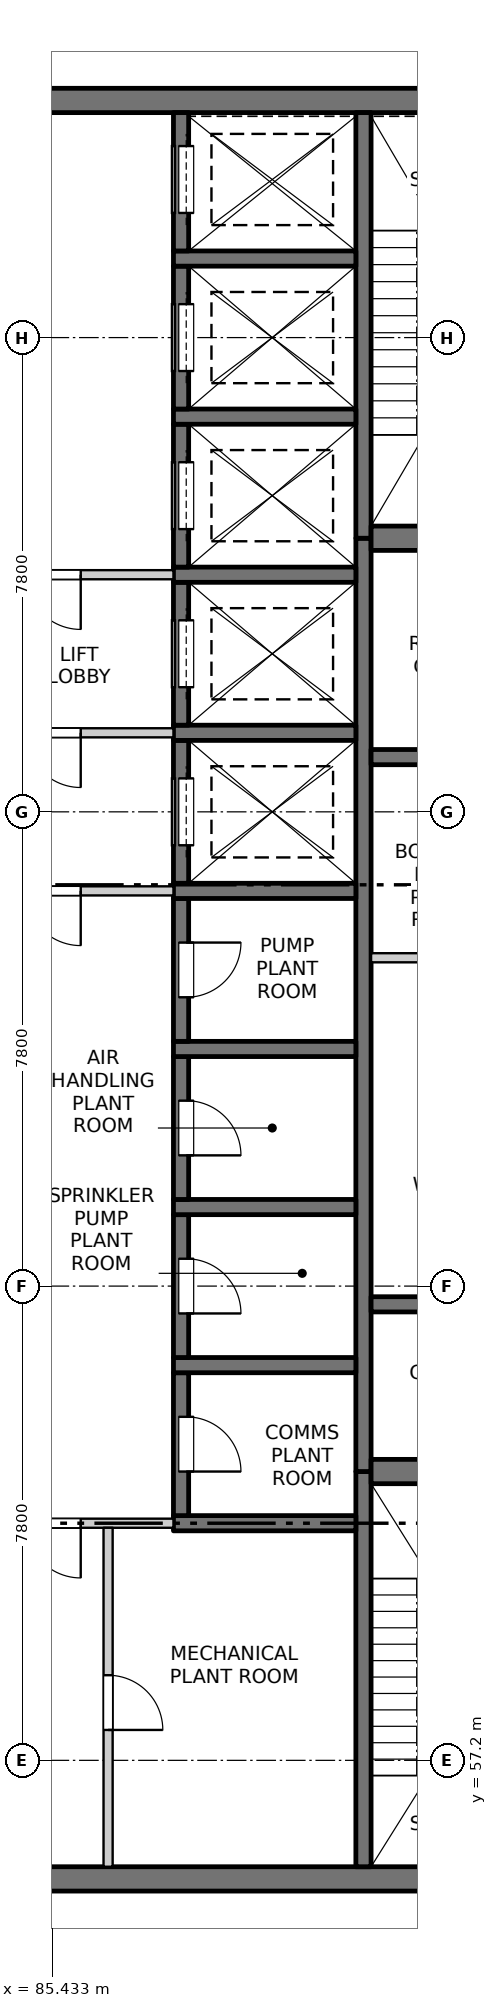
"""IFC4 building model, lengths in metres.
Left out: names, types, materials, properties, quantities, classifications, styles, units other than length and angle.
Written with IfcOpenShell. Run it as: python <this file> out.ifc"""

import sys

from ifc_helpers import new_model, si_unit, direction, frame, frame_2d, origin, place, context, subcontext, project, spatial, rectangle, extrude, element, fill, save


model = new_model("IFC4")
c1 = context("Model", 3, precision=1e-05, world=origin(), true_north=direction((0.0, 1.0)))
c2 = subcontext(c1, "Body", "Model", "MODEL_VIEW")
j1 = project(units=[si_unit("LENGTHUNIT", "METRE"), si_unit("PLANEANGLEUNIT", "RADIAN")], contexts=[c1])
p1 = place(None, origin())
s1 = spatial("IfcSite", under=j1, at=p1, CompositionType="ELEMENT")
p2 = place(p1, origin())
s2 = spatial("IfcBuilding", under=s1, at=p2, CompositionType="ELEMENT")
p3 = place(p2, frame((0.0, 0.0, 241.5)))
s3 = spatial("IfcBuildingStorey", under=s2, at=p3, CompositionType="ELEMENT", Elevation=241.5)
p4 = place(p3, frame((75.45, 55.25, -0.3), z_axis=(0.0, 0.0, 1.0), x_axis=(1.0, 0.0, 0.0)))
e1 = element("IfcWall", 1, at=p4, inside=s3, PredefinedType="SOLIDWALL", context=c2, shape_type="SweptSolid", body=[
    extrude(rectangle(XDim=19.1, YDim=0.4, at=frame_2d((9.55, 0.0))), origin(), (0.0, 0.0, 1.0), 4.5),
])
p5 = place(p4, frame((7.3, 0.0, 0.3)))
e2 = element("IfcOpeningElement", 2, at=p5, cuts=e1, PredefinedType="OPENING", context=c2, shape_type="SweptSolid", body=[
    extrude(rectangle(XDim=1.5, YDim=2.1, at=frame_2d((0.75, 1.05))), frame((0.0, 0.21, 0.0), z_axis=(0.0, -1.0, 0.0), x_axis=(1.0, 0.0, 0.0)), (0.0, 0.0, 1.0), 0.42),
])
p6 = place(p3, frame((75.45, 84.5, -0.3), z_axis=(0.0, 0.0, 1.0), x_axis=(1.0, 0.0, 0.0)))
e3 = element("IfcWall", 3, at=p6, inside=s3, PredefinedType="SOLIDWALL", context=c2, shape_type="SweptSolid", body=[
    extrude(rectangle(XDim=19.1, YDim=0.4, at=frame_2d((9.55, 0.0))), origin(), (0.0, 0.0, 1.0), 4.5),
])
p7 = place(p3, frame((90.55, 55.45, -0.3), z_axis=(0.0, 0.0, 1.0), x_axis=(0.0, 1.0, 0.0)))
e4 = element("IfcWall", 4, at=p7, inside=s3, PredefinedType="SOLIDWALL", context=c2, shape_type="SweptSolid", body=[
    extrude(rectangle(XDim=6.5, YDim=0.25, at=frame_2d((3.25, 0.0))), origin(), (0.0, 0.0, 1.0), 4.5),
])
p8 = place(p3, frame((90.55, 61.95, -0.3), z_axis=(0.0, 0.0, 1.0), x_axis=(0.0, 1.0, 0.0)))
e5 = element("IfcWall", 5, at=p8, inside=s3, PredefinedType="SOLIDWALL", context=c2, shape_type="SweptSolid", body=[
    extrude(rectangle(XDim=15.35, YDim=0.25, at=frame_2d((7.675, 0.0))), origin(), (0.0, 0.0, 1.0), 4.5),
])
p9 = place(p3, frame((90.55, 77.3, -0.3), z_axis=(0.0, 0.0, 1.0), x_axis=(0.0, 1.0, 0.0)))
e6 = element("IfcWall", 6, at=p9, inside=s3, PredefinedType="SOLIDWALL", context=c2, shape_type="SweptSolid", body=[
    extrude(rectangle(XDim=7.0, YDim=0.25, at=frame_2d((3.5, 0.0))), origin(), (0.0, 0.0, 1.0), 4.5),
])
p10 = place(p3, frame((87.425, 61.1, -0.3), z_axis=(0.0, 0.0, 1.0), x_axis=(1.0, 0.0, 0.0)))
e7 = element("IfcWall", 7, at=p10, inside=s3, PredefinedType="SOLIDWALL", context=c2, shape_type="SweptSolid", body=[
    extrude(rectangle(XDim=3.0, YDim=0.25, at=frame_2d((1.5, 0.0))), origin(), (0.0, 0.0, 1.0), 4.5),
])
p11 = place(p3, frame((87.55, 61.225, -0.3), z_axis=(0.0, 0.0, 1.0), x_axis=(0.0, 1.0, 0.0)))
e8 = element("IfcWall", 8, at=p11, inside=s3, PredefinedType="SOLIDWALL", context=c2, shape_type="SweptSolid", body=[
    extrude(rectangle(XDim=2.35, YDim=0.25, at=frame_2d((1.175, 0.0))), origin(), (0.0, 0.0, 1.0), 4.5),
])
p12 = place(p11, frame((0.725, 0.0, 0.3)))
e9 = element("IfcOpeningElement", 9, at=p12, cuts=e8, PredefinedType="OPENING", context=c2, shape_type="SweptSolid", body=[
    extrude(rectangle(XDim=0.9, YDim=2.1, at=frame_2d((0.45, 1.05))), frame((0.0, 0.135, 0.0), z_axis=(0.0, -1.0, 0.0), x_axis=(1.0, 0.0, 0.0)), (0.0, 0.0, 1.0), 0.27),
])
p13 = place(p3, frame((87.425, 63.7, -0.3), z_axis=(0.0, 0.0, 1.0), x_axis=(1.0, 0.0, 0.0)))
e10 = element("IfcWall", 10, at=p13, inside=s3, PredefinedType="SOLIDWALL", context=c2, shape_type="SweptSolid", body=[
    extrude(rectangle(XDim=3.0, YDim=0.25, at=frame_2d((1.5, 0.0))), origin(), (0.0, 0.0, 1.0), 4.5),
])
p14 = place(p3, frame((87.55, 63.825, -0.3), z_axis=(0.0, 0.0, 1.0), x_axis=(0.0, 1.0, 0.0)))
e11 = element("IfcWall", 11, at=p14, inside=s3, PredefinedType="SOLIDWALL", context=c2, shape_type="SweptSolid", body=[
    extrude(rectangle(XDim=2.35, YDim=0.25, at=frame_2d((1.175, 0.0))), origin(), (0.0, 0.0, 1.0), 4.5),
])
p15 = place(p14, frame((0.725, 0.0, 0.3)))
e12 = element("IfcOpeningElement", 12, at=p15, cuts=e11, PredefinedType="OPENING", context=c2, shape_type="SweptSolid", body=[
    extrude(rectangle(XDim=0.9, YDim=2.1, at=frame_2d((0.45, 1.05))), frame((0.0, 0.135, 0.0), z_axis=(0.0, -1.0, 0.0), x_axis=(1.0, 0.0, 0.0)), (0.0, 0.0, 1.0), 0.27),
])
p16 = place(p3, frame((87.425, 66.3, -0.3), z_axis=(0.0, 0.0, 1.0), x_axis=(1.0, 0.0, 0.0)))
e13 = element("IfcWall", 13, at=p16, inside=s3, PredefinedType="SOLIDWALL", context=c2, shape_type="SweptSolid", body=[
    extrude(rectangle(XDim=3.0, YDim=0.25, at=frame_2d((1.5, 0.0))), origin(), (0.0, 0.0, 1.0), 4.5),
])
p17 = place(p3, frame((87.55, 66.425, -0.3), z_axis=(0.0, 0.0, 1.0), x_axis=(0.0, 1.0, 0.0)))
e14 = element("IfcWall", 14, at=p17, inside=s3, PredefinedType="SOLIDWALL", context=c2, shape_type="SweptSolid", body=[
    extrude(rectangle(XDim=2.35, YDim=0.25, at=frame_2d((1.175, 0.0))), origin(), (0.0, 0.0, 1.0), 4.5),
])
p18 = place(p17, frame((0.725, 0.0, 0.3)))
e15 = element("IfcOpeningElement", 15, at=p18, cuts=e14, PredefinedType="OPENING", context=c2, shape_type="SweptSolid", body=[
    extrude(rectangle(XDim=0.9, YDim=2.1, at=frame_2d((0.45, 1.05))), frame((0.0, 0.135, 0.0), z_axis=(0.0, -1.0, 0.0), x_axis=(1.0, 0.0, 0.0)), (0.0, 0.0, 1.0), 0.27),
])
p19 = place(p3, frame((87.425, 68.9, -0.3), z_axis=(0.0, 0.0, 1.0), x_axis=(1.0, 0.0, 0.0)))
e16 = element("IfcWall", 16, at=p19, inside=s3, PredefinedType="SOLIDWALL", context=c2, shape_type="SweptSolid", body=[
    extrude(rectangle(XDim=3.0, YDim=0.25, at=frame_2d((1.5, 0.0))), origin(), (0.0, 0.0, 1.0), 4.5),
])
p20 = place(p3, frame((87.55, 69.025, -0.3), z_axis=(0.0, 0.0, 1.0), x_axis=(0.0, 1.0, 0.0)))
e17 = element("IfcWall", 17, at=p20, inside=s3, PredefinedType="SOLIDWALL", context=c2, shape_type="SweptSolid", body=[
    extrude(rectangle(XDim=2.35, YDim=0.25, at=frame_2d((1.175, 0.0))), origin(), (0.0, 0.0, 1.0), 4.5),
])
p21 = place(p20, frame((0.725, 0.0, 0.3)))
e18 = element("IfcOpeningElement", 18, at=p21, cuts=e17, PredefinedType="OPENING", context=c2, shape_type="SweptSolid", body=[
    extrude(rectangle(XDim=0.9, YDim=2.1, at=frame_2d((0.45, 1.05))), frame((0.0, 0.135, 0.0), z_axis=(0.0, -1.0, 0.0), x_axis=(1.0, 0.0, 0.0)), (0.0, 0.0, 1.0), 0.27),
])
p22 = place(p3, frame((87.425, 71.5, -0.3), z_axis=(0.0, 0.0, 1.0), x_axis=(1.0, 0.0, 0.0)))
e19 = element("IfcWall", 19, at=p22, inside=s3, PredefinedType="SOLIDWALL", context=c2, shape_type="SweptSolid", body=[
    extrude(rectangle(XDim=3.0, YDim=0.25, at=frame_2d((1.5, 0.0))), origin(), (0.0, 0.0, 1.0), 4.5),
])
p23 = place(p3, frame((87.55, 71.625, -0.3), z_axis=(0.0, 0.0, 1.0), x_axis=(0.0, 1.0, 0.0)))
e20 = element("IfcWall", 20, at=p23, inside=s3, PredefinedType="SOLIDWALL", context=c2, shape_type="SweptSolid", body=[
    extrude(rectangle(XDim=2.35, YDim=0.25, at=frame_2d((1.175, 0.0))), origin(), (0.0, 0.0, 1.0), 4.5),
])
p24 = place(p23, frame((0.625, 0.0, 0.3)))
e21 = element("IfcOpeningElement", 21, at=p24, cuts=e20, PredefinedType="OPENING", context=c2, shape_type="SweptSolid", body=[
    extrude(rectangle(XDim=1.1, YDim=2.1, at=frame_2d((0.55, 1.05))), frame((0.0, 0.135, 0.0), z_axis=(0.0, -1.0, 0.0), x_axis=(1.0, 0.0, 0.0)), (0.0, 0.0, 1.0), 0.27),
])
p25 = place(p3, frame((87.425, 74.1, -0.3), z_axis=(0.0, 0.0, 1.0), x_axis=(1.0, 0.0, 0.0)))
e22 = element("IfcWall", 22, at=p25, inside=s3, PredefinedType="SOLIDWALL", context=c2, shape_type="SweptSolid", body=[
    extrude(rectangle(XDim=3.0, YDim=0.25, at=frame_2d((1.5, 0.0))), origin(), (0.0, 0.0, 1.0), 4.5),
])
p26 = place(p3, frame((87.55, 74.225, -0.3), z_axis=(0.0, 0.0, 1.0), x_axis=(0.0, 1.0, 0.0)))
e23 = element("IfcWall", 23, at=p26, inside=s3, PredefinedType="SOLIDWALL", context=c2, shape_type="SweptSolid", body=[
    extrude(rectangle(XDim=2.35, YDim=0.25, at=frame_2d((1.175, 0.0))), origin(), (0.0, 0.0, 1.0), 4.5),
])
p27 = place(p26, frame((0.625, 0.0, 0.3)))
e24 = element("IfcOpeningElement", 24, at=p27, cuts=e23, PredefinedType="OPENING", context=c2, shape_type="SweptSolid", body=[
    extrude(rectangle(XDim=1.1, YDim=2.1, at=frame_2d((0.55, 1.05))), frame((0.0, 0.135, 0.0), z_axis=(0.0, -1.0, 0.0), x_axis=(1.0, 0.0, 0.0)), (0.0, 0.0, 1.0), 0.27),
])
p28 = place(p3, frame((87.425, 76.7, -0.3), z_axis=(0.0, 0.0, 1.0), x_axis=(1.0, 0.0, 0.0)))
e25 = element("IfcWall", 25, at=p28, inside=s3, PredefinedType="SOLIDWALL", context=c2, shape_type="SweptSolid", body=[
    extrude(rectangle(XDim=3.0, YDim=0.25, at=frame_2d((1.5, 0.0))), origin(), (0.0, 0.0, 1.0), 4.5),
])
p29 = place(p3, frame((87.55, 76.825, -0.3), z_axis=(0.0, 0.0, 1.0), x_axis=(0.0, 1.0, 0.0)))
e26 = element("IfcWall", 26, at=p29, inside=s3, PredefinedType="SOLIDWALL", context=c2, shape_type="SweptSolid", body=[
    extrude(rectangle(XDim=2.35, YDim=0.25, at=frame_2d((1.175, 0.0))), origin(), (0.0, 0.0, 1.0), 4.5),
])
p30 = place(p29, frame((0.625, 0.0, 0.3)))
e27 = element("IfcOpeningElement", 27, at=p30, cuts=e26, PredefinedType="OPENING", context=c2, shape_type="SweptSolid", body=[
    extrude(rectangle(XDim=1.1, YDim=2.1, at=frame_2d((0.55, 1.05))), frame((0.0, 0.135, 0.0), z_axis=(0.0, -1.0, 0.0), x_axis=(1.0, 0.0, 0.0)), (0.0, 0.0, 1.0), 0.27),
])
p31 = place(p3, frame((87.425, 79.3, -0.3), z_axis=(0.0, 0.0, 1.0), x_axis=(1.0, 0.0, 0.0)))
e28 = element("IfcWall", 28, at=p31, inside=s3, PredefinedType="SOLIDWALL", context=c2, shape_type="SweptSolid", body=[
    extrude(rectangle(XDim=3.0, YDim=0.25, at=frame_2d((1.5, 0.0))), origin(), (0.0, 0.0, 1.0), 4.5),
])
p32 = place(p3, frame((87.55, 79.425, -0.3), z_axis=(0.0, 0.0, 1.0), x_axis=(0.0, 1.0, 0.0)))
e29 = element("IfcWall", 29, at=p32, inside=s3, PredefinedType="SOLIDWALL", context=c2, shape_type="SweptSolid", body=[
    extrude(rectangle(XDim=2.35, YDim=0.25, at=frame_2d((1.175, 0.0))), origin(), (0.0, 0.0, 1.0), 4.5),
])
p33 = place(p32, frame((0.625, 0.0, 0.3)))
e30 = element("IfcOpeningElement", 30, at=p33, cuts=e29, PredefinedType="OPENING", context=c2, shape_type="SweptSolid", body=[
    extrude(rectangle(XDim=1.1, YDim=2.1, at=frame_2d((0.55, 1.05))), frame((0.0, 0.135, 0.0), z_axis=(0.0, -1.0, 0.0), x_axis=(1.0, 0.0, 0.0)), (0.0, 0.0, 1.0), 0.27),
])
p34 = place(p3, frame((87.425, 81.9, -0.3), z_axis=(0.0, 0.0, 1.0), x_axis=(1.0, 0.0, 0.0)))
e31 = element("IfcWall", 31, at=p34, inside=s3, PredefinedType="SOLIDWALL", context=c2, shape_type="SweptSolid", body=[
    extrude(rectangle(XDim=3.0, YDim=0.25, at=frame_2d((1.5, 0.0))), origin(), (0.0, 0.0, 1.0), 4.5),
])
p35 = place(p3, frame((87.55, 82.025, -0.3), z_axis=(0.0, 0.0, 1.0), x_axis=(0.0, 1.0, 0.0)))
e32 = element("IfcWall", 32, at=p35, inside=s3, PredefinedType="SOLIDWALL", context=c2, shape_type="SweptSolid", body=[
    extrude(rectangle(XDim=2.275, YDim=0.25, at=frame_2d((1.138, 0.0))), origin(), (0.0, 0.0, 1.0), 4.5),
])
p36 = place(p35, frame((0.625, 0.0, 0.3)))
e33 = element("IfcOpeningElement", 33, at=p36, cuts=e32, PredefinedType="OPENING", context=c2, shape_type="SweptSolid", body=[
    extrude(rectangle(XDim=1.1, YDim=2.1, at=frame_2d((0.55, 1.05))), frame((0.0, 0.135, 0.0), z_axis=(0.0, -1.0, 0.0), x_axis=(1.0, 0.0, 0.0)), (0.0, 0.0, 1.0), 0.27),
])
p37 = place(p3, frame((90.675, 61.95, -0.3), z_axis=(0.0, 0.0, 1.0), x_axis=(1.0, 0.0, 0.0)))
e34 = element("IfcWall", 34, at=p37, inside=s3, PredefinedType="SOLIDWALL", context=c2, shape_type="SweptSolid", body=[
    extrude(rectangle(XDim=3.875, YDim=0.4, at=frame_2d((1.938, 0.0))), origin(), (0.0, 0.0, 1.0), 4.5),
])
for number, where, z_axis, x_axis in (
    (35, (90.675, 64.7, -0.3), (0.0, 0.0, 1.0), (1.0, 0.0, 0.0)),
    (36, (90.675, 73.7, -0.3), (0.0, 0.0, 1.0), (1.0, 0.0, 0.0)),
):
    element("IfcWall", number, at=place(p3, frame(where, z_axis=z_axis, x_axis=x_axis)), inside=s3, PredefinedType="SOLIDWALL", context=c2, shape_type="SweptSolid", body=[
        extrude(rectangle(XDim=3.875, YDim=0.25, at=frame_2d((1.938, 0.0))), origin(), (0.0, 0.0, 1.0), 4.5),
    ])
p38 = place(p3, frame((90.675, 77.3, -0.3), z_axis=(0.0, 0.0, 1.0), x_axis=(1.0, 0.0, 0.0)))
e37 = element("IfcWall", 37, at=p38, inside=s3, PredefinedType="SOLIDWALL", context=c2, shape_type="SweptSolid", body=[
    extrude(rectangle(XDim=3.875, YDim=0.4, at=frame_2d((1.938, 0.0))), origin(), (0.0, 0.0, 1.0), 4.5),
])
p39 = place(p3, frame((82.575, 61.1, 0.0), z_axis=(0.0, 0.0, 1.0), x_axis=(1.0, 0.0, 0.0)))
e38 = element("IfcWall", 38, at=p39, inside=s3, PredefinedType="PARTITIONING", context=c2, shape_type="SweptSolid", body=[
    extrude(rectangle(XDim=4.85, YDim=0.15, at=frame_2d((2.425, 0.0))), origin(), (0.0, 0.0, 1.0), 4.2),
])
p40 = place(p39, frame((1.525, 0.0, 0.0)))
e39 = element("IfcOpeningElement", 39, at=p40, cuts=e38, PredefinedType="OPENING", context=c2, shape_type="SweptSolid", body=[
    extrude(rectangle(XDim=1.8, YDim=2.1, at=frame_2d((0.9, 1.05))), frame((0.0, 0.085, 0.0), z_axis=(0.0, -1.0, 0.0), x_axis=(1.0, 0.0, 0.0)), (0.0, 0.0, 1.0), 0.17),
])
p41 = place(p3, frame((90.675, 70.4, 0.0), z_axis=(0.0, 0.0, 1.0), x_axis=(1.0, 0.0, 0.0)))
e40 = element("IfcWall", 40, at=p41, inside=s3, PredefinedType="PARTITIONING", context=c2, shape_type="SweptSolid", body=[
    extrude(rectangle(XDim=3.875, YDim=0.15, at=frame_2d((1.938, 0.0))), origin(), (0.0, 0.0, 1.0), 4.2),
])
p42 = place(p3, frame((82.575, 71.5, 0.0), z_axis=(0.0, 0.0, 1.0), x_axis=(1.0, 0.0, 0.0)))
e41 = element("IfcWall", 41, at=p42, inside=s3, PredefinedType="PARTITIONING", context=c2, shape_type="SweptSolid", body=[
    extrude(rectangle(XDim=4.85, YDim=0.15, at=frame_2d((2.425, 0.0))), origin(), (0.0, 0.0, 1.0), 4.2),
])
p43 = place(p42, frame((1.525, 0.0, 0.0)))
e42 = element("IfcOpeningElement", 42, at=p43, cuts=e41, PredefinedType="OPENING", context=c2, shape_type="SweptSolid", body=[
    extrude(rectangle(XDim=1.8, YDim=2.1, at=frame_2d((0.9, 1.05))), frame((0.0, 0.085, 0.0), z_axis=(0.0, -1.0, 0.0), x_axis=(1.0, 0.0, 0.0)), (0.0, 0.0, 1.0), 0.17),
])
p44 = place(p3, frame((82.575, 74.1, 0.0), z_axis=(0.0, 0.0, 1.0), x_axis=(1.0, 0.0, 0.0)))
e43 = element("IfcWall", 43, at=p44, inside=s3, PredefinedType="PARTITIONING", context=c2, shape_type="SweptSolid", body=[
    extrude(rectangle(XDim=4.85, YDim=0.15, at=frame_2d((2.425, 0.0))), origin(), (0.0, 0.0, 1.0), 4.2),
])
p45 = place(p44, frame((1.525, 0.0, 0.0)))
e44 = element("IfcOpeningElement", 44, at=p45, cuts=e43, PredefinedType="OPENING", context=c2, shape_type="SweptSolid", body=[
    extrude(rectangle(XDim=1.8, YDim=2.1, at=frame_2d((0.9, 1.05))), frame((0.0, 0.085, 0.0), z_axis=(0.0, -1.0, 0.0), x_axis=(1.0, 0.0, 0.0)), (0.0, 0.0, 1.0), 0.17),
])
p46 = place(p3, frame((82.575, 76.7, 0.0), z_axis=(0.0, 0.0, 1.0), x_axis=(1.0, 0.0, 0.0)))
e45 = element("IfcWall", 45, at=p46, inside=s3, PredefinedType="PARTITIONING", context=c2, shape_type="SweptSolid", body=[
    extrude(rectangle(XDim=4.85, YDim=0.15, at=frame_2d((2.425, 0.0))), origin(), (0.0, 0.0, 1.0), 4.2),
])
p47 = place(p46, frame((1.525, 0.0, 0.0)))
e46 = element("IfcOpeningElement", 46, at=p47, cuts=e45, PredefinedType="OPENING", context=c2, shape_type="SweptSolid", body=[
    extrude(rectangle(XDim=1.8, YDim=2.1, at=frame_2d((0.9, 1.05))), frame((0.0, 0.085, 0.0), z_axis=(0.0, -1.0, 0.0), x_axis=(1.0, 0.0, 0.0)), (0.0, 0.0, 1.0), 0.17),
])
p48 = place(p3, frame((86.35, 55.45, 0.0), z_axis=(0.0, 0.0, 1.0), x_axis=(0.0, 1.0, 0.0)))
e47 = element("IfcWall", 47, at=p48, inside=s3, PredefinedType="PARTITIONING", context=c2, shape_type="SweptSolid", body=[
    extrude(rectangle(XDim=5.575, YDim=0.15, at=frame_2d((2.788, 0.0))), origin(), (0.0, 0.0, 1.0), 4.2),
])
p49 = place(p48, frame((2.25, 0.0, 0.0)))
e48 = element("IfcOpeningElement", 48, at=p49, cuts=e47, PredefinedType="OPENING", context=c2, shape_type="SweptSolid", body=[
    extrude(rectangle(XDim=0.9, YDim=2.1, at=frame_2d((0.45, 1.05))), frame((0.0, 0.085, 0.0), z_axis=(0.0, -1.0, 0.0), x_axis=(1.0, 0.0, 0.0)), (0.0, 0.0, 1.0), 0.17),
])
p50 = place(p49, origin())
e49 = element("IfcDoor", 49, at=p50, inside=s3, OperationType="SINGLE_SWING_RIGHT", PredefinedType="DOOR", context=c2, shape_type="SweptSolid", body=[
    extrude(rectangle(XDim=0.9, YDim=2.1, at=frame_2d((0.45, 1.05))), frame((0.0, 0.025, 0.0), z_axis=(0.0, -1.0, 0.0), x_axis=(1.0, 0.0, 0.0)), (0.0, 0.0, 1.0), 0.05),
])
fill(e48, e49)
p51 = place(p40, origin())
e50 = element("IfcDoor", 50, at=p51, inside=s3, OperationType="DOUBLE_DOOR_SINGLE_SWING", PredefinedType="DOOR", context=c2, shape_type="SweptSolid", body=[
    extrude(rectangle(XDim=1.8, YDim=2.1, at=frame_2d((0.9, 1.05))), frame((0.0, 0.025, 0.0), z_axis=(0.0, -1.0, 0.0), x_axis=(1.0, 0.0, 0.0)), (0.0, 0.0, 1.0), 0.05),
])
fill(e39, e50)
p52 = place(p12, origin())
e51 = element("IfcDoor", 51, at=p52, inside=s3, OperationType="SINGLE_SWING_RIGHT", PredefinedType="DOOR", context=c2, shape_type="SweptSolid", body=[
    extrude(rectangle(XDim=0.9, YDim=2.1, at=frame_2d((0.45, 1.05))), frame((0.0, -0.06, 0.0), z_axis=(0.0, -1.0, 0.0), x_axis=(1.0, 0.0, 0.0)), (0.0, 0.0, 1.0), 0.05),
])
fill(e9, e51)
p53 = place(p15, origin())
e52 = element("IfcDoor", 52, at=p53, inside=s3, OperationType="SINGLE_SWING_RIGHT", PredefinedType="DOOR", context=c2, shape_type="SweptSolid", body=[
    extrude(rectangle(XDim=0.9, YDim=2.1, at=frame_2d((0.45, 1.05))), frame((0.0, -0.06, 0.0), z_axis=(0.0, -1.0, 0.0), x_axis=(1.0, 0.0, 0.0)), (0.0, 0.0, 1.0), 0.05),
])
fill(e12, e52)
p54 = place(p18, origin())
e53 = element("IfcDoor", 53, at=p54, inside=s3, OperationType="SINGLE_SWING_RIGHT", PredefinedType="DOOR", context=c2, shape_type="SweptSolid", body=[
    extrude(rectangle(XDim=0.9, YDim=2.1, at=frame_2d((0.45, 1.05))), frame((0.0, -0.06, 0.0), z_axis=(0.0, -1.0, 0.0), x_axis=(1.0, 0.0, 0.0)), (0.0, 0.0, 1.0), 0.05),
])
fill(e15, e53)
p55 = place(p21, origin())
e54 = element("IfcDoor", 54, at=p55, inside=s3, OperationType="SINGLE_SWING_LEFT", PredefinedType="DOOR", context=c2, shape_type="SweptSolid", body=[
    extrude(rectangle(XDim=0.9, YDim=2.1, at=frame_2d((0.45, 1.05))), frame((0.0, -0.06, 0.0), z_axis=(0.0, -1.0, 0.0), x_axis=(1.0, 0.0, 0.0)), (0.0, 0.0, 1.0), 0.05),
])
fill(e18, e54)
p56 = place(p43, origin())
e55 = element("IfcDoor", 55, at=p56, inside=s3, OperationType="DOUBLE_DOOR_SINGLE_SWING", PredefinedType="DOOR", context=c2, shape_type="SweptSolid", body=[
    extrude(rectangle(XDim=1.8, YDim=2.1, at=frame_2d((0.9, 1.05))), frame((0.0, 0.025, 0.0), z_axis=(0.0, -1.0, 0.0), x_axis=(1.0, 0.0, 0.0)), (0.0, 0.0, 1.0), 0.05),
])
fill(e42, e55)
p57 = place(p24, origin())
e56 = element("IfcDoor", 56, at=p57, inside=s3, OperationType="SLIDING_TO_LEFT", PredefinedType="DOOR", context=c2, shape_type="SweptSolid", body=[
    extrude(rectangle(XDim=1.1, YDim=2.1, at=frame_2d((0.55, 1.05))), frame((0.0, -0.06, 0.0), z_axis=(0.0, -1.0, 0.0), x_axis=(1.0, 0.0, 0.0)), (0.0, 0.0, 1.0), 0.05),
])
fill(e21, e56)
p58 = place(p45, origin())
e57 = element("IfcDoor", 57, at=p58, inside=s3, OperationType="DOUBLE_DOOR_SINGLE_SWING", PredefinedType="DOOR", context=c2, shape_type="SweptSolid", body=[
    extrude(rectangle(XDim=1.8, YDim=2.1, at=frame_2d((0.9, 1.05))), frame((0.0, 0.025, 0.0), z_axis=(0.0, -1.0, 0.0), x_axis=(1.0, 0.0, 0.0)), (0.0, 0.0, 1.0), 0.05),
])
fill(e44, e57)
p59 = place(p27, origin())
e58 = element("IfcDoor", 58, at=p59, inside=s3, OperationType="SLIDING_TO_LEFT", PredefinedType="DOOR", context=c2, shape_type="SweptSolid", body=[
    extrude(rectangle(XDim=1.1, YDim=2.1, at=frame_2d((0.55, 1.05))), frame((0.0, -0.06, 0.0), z_axis=(0.0, -1.0, 0.0), x_axis=(1.0, 0.0, 0.0)), (0.0, 0.0, 1.0), 0.05),
])
fill(e24, e58)
p60 = place(p47, origin())
e59 = element("IfcDoor", 59, at=p60, inside=s3, OperationType="DOUBLE_DOOR_SINGLE_SWING", PredefinedType="DOOR", context=c2, shape_type="SweptSolid", body=[
    extrude(rectangle(XDim=1.8, YDim=2.1, at=frame_2d((0.9, 1.05))), frame((0.0, 0.025, 0.0), z_axis=(0.0, -1.0, 0.0), x_axis=(1.0, 0.0, 0.0)), (0.0, 0.0, 1.0), 0.05),
])
fill(e46, e59)
p61 = place(p30, origin())
e60 = element("IfcDoor", 60, at=p61, inside=s3, OperationType="SLIDING_TO_LEFT", PredefinedType="DOOR", context=c2, shape_type="SweptSolid", body=[
    extrude(rectangle(XDim=1.1, YDim=2.1, at=frame_2d((0.55, 1.05))), frame((0.0, -0.06, 0.0), z_axis=(0.0, -1.0, 0.0), x_axis=(1.0, 0.0, 0.0)), (0.0, 0.0, 1.0), 0.05),
])
fill(e27, e60)
p62 = place(p33, origin())
e61 = element("IfcDoor", 61, at=p62, inside=s3, OperationType="SLIDING_TO_RIGHT", PredefinedType="DOOR", context=c2, shape_type="SweptSolid", body=[
    extrude(rectangle(XDim=1.1, YDim=2.1, at=frame_2d((0.55, 1.05))), frame((0.0, -0.06, 0.0), z_axis=(0.0, -1.0, 0.0), x_axis=(1.0, 0.0, 0.0)), (0.0, 0.0, 1.0), 0.05),
])
fill(e30, e61)
p63 = place(p36, origin())
e62 = element("IfcDoor", 62, at=p63, inside=s3, OperationType="SLIDING_TO_RIGHT", PredefinedType="DOOR", context=c2, shape_type="SweptSolid", body=[
    extrude(rectangle(XDim=1.1, YDim=2.1, at=frame_2d((0.55, 1.05))), frame((0.0, -0.06, 0.0), z_axis=(0.0, -1.0, 0.0), x_axis=(1.0, 0.0, 0.0)), (0.0, 0.0, 1.0), 0.05),
])
fill(e33, e62)
save(model, sys.argv[1])
